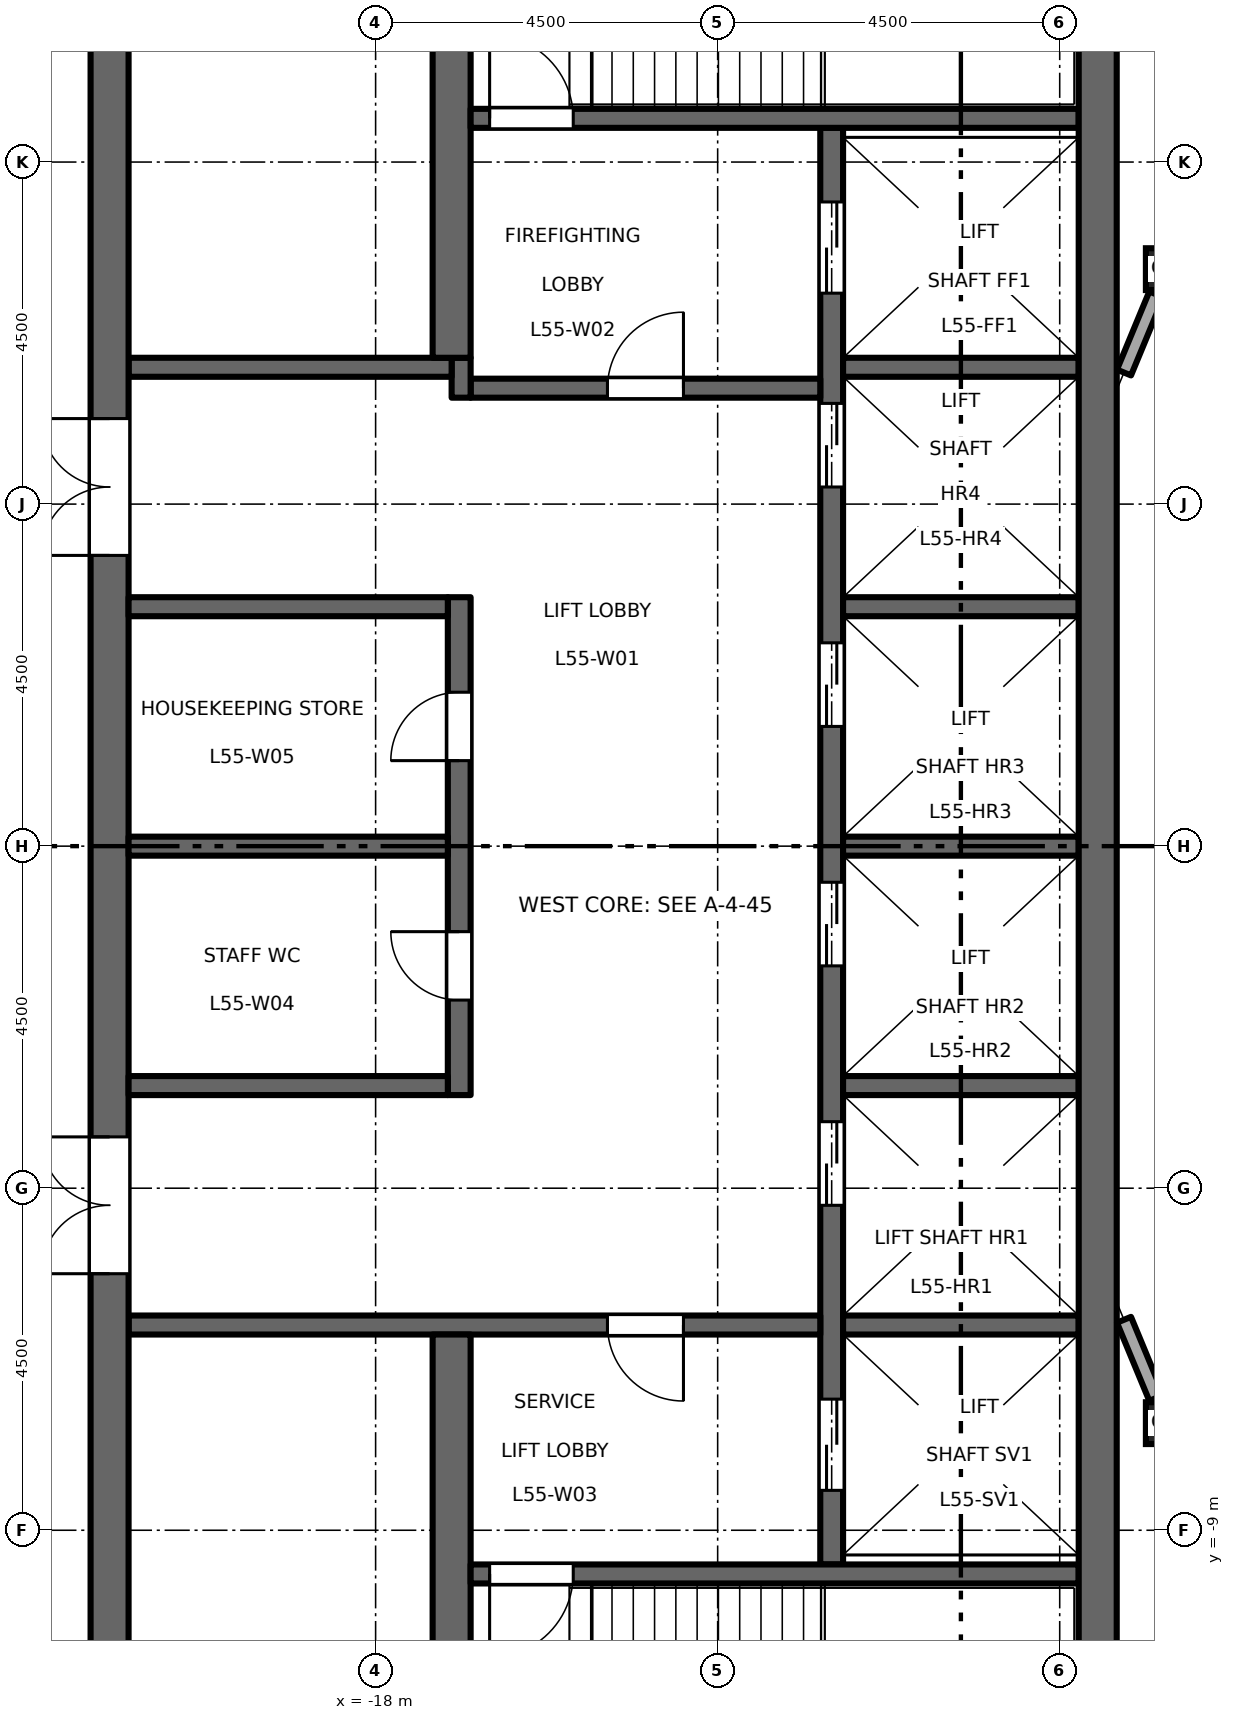
"""IFC4 building model, lengths in metres.
Left out: names, types, materials, properties, quantities, classifications, styles, units other than length and angle.
Written with IfcOpenShell. Run it as: python <this file> out.ifc"""

import sys

from ifc_helpers import new_model, si_unit, direction, frame, frame_2d, origin, origin_2d, place, context, subcontext, project, spatial, rectangle, hollow_rectangle, extrude, element, fill, save


model = new_model("IFC4")
c1 = context("Model", 3, precision=1e-05, world=origin(), true_north=direction((0.0, 1.0)))
c2 = subcontext(c1, "Body", "Model", "MODEL_VIEW")
j1 = project(units=[si_unit("LENGTHUNIT", "METRE"), si_unit("PLANEANGLEUNIT", "RADIAN")], contexts=[c1])
p1 = place(None, origin())
s1 = spatial("IfcSite", under=j1, at=p1, CompositionType="ELEMENT")
p2 = place(p1, origin())
s2 = spatial("IfcBuilding", under=s1, at=p2, CompositionType="ELEMENT")
p3 = place(p2, frame((0.0, 0.0, 255.7)))
s3 = spatial("IfcBuildingStorey", under=s2, at=p3, CompositionType="ELEMENT", Elevation=255.7)
for number, where, z_axis, x_axis in (
    (1, (-7.591, -7.591, 0.0), (0.0, 0.0, 1.0), (1.0, 0.0, 0.0)),
    (2, (-7.591, 7.591, 0.0), (0.0, 0.0, 1.0), (1.0, 0.0, 0.0)),
):
    element("IfcColumn", number, at=place(p3, frame(where, z_axis=z_axis, x_axis=x_axis)), inside=s3, PredefinedType="COLUMN", context=c2, shape_type="SweptSolid", body=[
        extrude(hollow_rectangle(XDim=0.55, YDim=0.55, WallThickness=0.028, at=origin_2d()), origin(), (0.0, 0.0, 1.0), 4.5),
    ])
p4 = place(p3, frame((-12.0, -9.45, 0.0), z_axis=(0.0, 0.0, 1.0), x_axis=(0.0, 1.0, 0.0)))
e3 = element("IfcWall", 3, at=p4, inside=s3, PredefinedType="SHEAR", context=c2, shape_type="SweptSolid", body=[
    extrude(rectangle(XDim=18.9, YDim=0.3, at=frame_2d((9.45, 0.0))), origin(), (0.0, 0.0, 1.0), 4.35),
])
p5 = place(p4, frame((4.725, 0.0, 0.0)))
e4 = element("IfcOpeningElement", 4, at=p5, cuts=e3, PredefinedType="OPENING", context=c2, shape_type="SweptSolid", body=[
    extrude(rectangle(XDim=1.1, YDim=2.1, at=frame_2d((0.55, 1.05))), frame((0.0, 0.16, 0.0), z_axis=(0.0, -1.0, 0.0), x_axis=(1.0, 0.0, 0.0)), (0.0, 0.0, 1.0), 0.32),
])
p6 = place(p4, frame((7.875, 0.0, 0.0)))
e5 = element("IfcOpeningElement", 5, at=p6, cuts=e3, PredefinedType="OPENING", context=c2, shape_type="SweptSolid", body=[
    extrude(rectangle(XDim=1.1, YDim=2.1, at=frame_2d((0.55, 1.05))), frame((0.0, 0.16, 0.0), z_axis=(0.0, -1.0, 0.0), x_axis=(1.0, 0.0, 0.0)), (0.0, 0.0, 1.0), 0.32),
])
p7 = place(p4, frame((11.025, 0.0, 0.0)))
e6 = element("IfcOpeningElement", 6, at=p7, cuts=e3, PredefinedType="OPENING", context=c2, shape_type="SweptSolid", body=[
    extrude(rectangle(XDim=1.1, YDim=2.1, at=frame_2d((0.55, 1.05))), frame((0.0, 0.16, 0.0), z_axis=(0.0, -1.0, 0.0), x_axis=(1.0, 0.0, 0.0)), (0.0, 0.0, 1.0), 0.32),
])
p8 = place(p4, frame((14.175, 0.0, 0.0)))
e7 = element("IfcOpeningElement", 7, at=p8, cuts=e3, PredefinedType="OPENING", context=c2, shape_type="SweptSolid", body=[
    extrude(rectangle(XDim=1.1, YDim=2.1, at=frame_2d((0.55, 1.05))), frame((0.0, 0.16, 0.0), z_axis=(0.0, -1.0, 0.0), x_axis=(1.0, 0.0, 0.0)), (0.0, 0.0, 1.0), 0.32),
])
p9 = place(p4, frame((16.725, 0.0, 0.0)))
e8 = element("IfcOpeningElement", 8, at=p9, cuts=e3, PredefinedType="OPENING", context=c2, shape_type="SweptSolid", body=[
    extrude(rectangle(XDim=1.2, YDim=2.1, at=frame_2d((0.6, 1.05))), frame((0.0, 0.16, 0.0), z_axis=(0.0, -1.0, 0.0), x_axis=(1.0, 0.0, 0.0)), (0.0, 0.0, 1.0), 0.32),
])
p10 = place(p4, frame((0.975, 0.0, 0.0)))
e9 = element("IfcOpeningElement", 9, at=p10, cuts=e3, PredefinedType="OPENING", context=c2, shape_type="SweptSolid", body=[
    extrude(rectangle(XDim=1.2, YDim=2.1, at=frame_2d((0.6, 1.05))), frame((0.0, 0.16, 0.0), z_axis=(0.0, -1.0, 0.0), x_axis=(1.0, 0.0, 0.0)), (0.0, 0.0, 1.0), 0.32),
])
p11 = place(p3, frame((-12.15, 6.025, 0.0), z_axis=(0.0, 0.0, 1.0), x_axis=(-1.0, 0.0, 0.0)))
e10 = element("IfcWall", 10, at=p11, inside=s3, PredefinedType="SHEAR", context=c2, shape_type="SweptSolid", body=[
    extrude(rectangle(XDim=4.6, YDim=0.25, at=frame_2d((2.3, 0.0))), origin(), (0.0, 0.0, 1.0), 4.35),
])
p12 = place(p11, frame((1.8, 0.0, 0.0)))
e11 = element("IfcOpeningElement", 11, at=p12, cuts=e10, PredefinedType="OPENING", context=c2, shape_type="SweptSolid", body=[
    extrude(rectangle(XDim=1.0, YDim=2.1, at=frame_2d((0.5, 1.05))), frame((0.0, 0.135, 0.0), z_axis=(0.0, -1.0, 0.0), x_axis=(1.0, 0.0, 0.0)), (0.0, 0.0, 1.0), 0.27),
])
p13 = place(p3, frame((-16.875, 5.9, 0.0), z_axis=(0.0, 0.0, 1.0), x_axis=(0.0, 1.0, 0.0)))
e12 = element("IfcWall", 12, at=p13, inside=s3, PredefinedType="SHEAR", context=c2, shape_type="SweptSolid", body=[
    extrude(rectangle(XDim=0.525, YDim=0.25, at=frame_2d((0.263, 0.0))), origin(), (0.0, 0.0, 1.0), 4.35),
])
p14 = place(p3, frame((-17.0, 6.3, 0.0), z_axis=(0.0, 0.0, 1.0), x_axis=(-1.0, 0.0, 0.0)))
e13 = element("IfcWall", 13, at=p14, inside=s3, PredefinedType="SHEAR", context=c2, shape_type="SweptSolid", body=[
    extrude(rectangle(XDim=4.25, YDim=0.25, at=frame_2d((2.125, 0.0))), origin(), (0.0, 0.0, 1.0), 4.35),
])
p15 = place(p3, frame((-12.15, -6.3, 0.0), z_axis=(0.0, 0.0, 1.0), x_axis=(-1.0, 0.0, 0.0)))
e14 = element("IfcWall", 14, at=p15, inside=s3, PredefinedType="SHEAR", context=c2, shape_type="SweptSolid", body=[
    extrude(rectangle(XDim=9.1, YDim=0.25, at=frame_2d((4.55, 0.0))), origin(), (0.0, 0.0, 1.0), 4.35),
])
p16 = place(p15, frame((1.8, 0.0, 0.0)))
e15 = element("IfcOpeningElement", 15, at=p16, cuts=e14, PredefinedType="OPENING", context=c2, shape_type="SweptSolid", body=[
    extrude(rectangle(XDim=1.0, YDim=2.1, at=frame_2d((0.5, 1.05))), frame((0.0, 0.135, 0.0), z_axis=(0.0, -1.0, 0.0), x_axis=(1.0, 0.0, 0.0)), (0.0, 0.0, 1.0), 0.27),
])
p17 = place(p3, frame((-21.5, -13.0, 0.0), z_axis=(0.0, 0.0, 1.0), x_axis=(0.0, 1.0, 0.0)))
e16 = element("IfcWall", 16, at=p17, inside=s3, PredefinedType="SHEAR", context=c2, shape_type="SweptSolid", body=[
    extrude(rectangle(XDim=26.0, YDim=0.5, at=frame_2d((13.0, 0.0))), origin(), (0.0, 0.0, 1.0), 4.35),
])
p18 = place(p17, frame((16.825, 0.0, 0.0)))
e17 = element("IfcOpeningElement", 17, at=p18, cuts=e16, PredefinedType="OPENING", context=c2, shape_type="SweptSolid", body=[
    extrude(rectangle(XDim=1.8, YDim=2.1, at=frame_2d((0.9, 1.05))), frame((0.0, 0.26, 0.0), z_axis=(0.0, -1.0, 0.0), x_axis=(1.0, 0.0, 0.0)), (0.0, 0.0, 1.0), 0.52),
])
p19 = place(p17, frame((7.375, 0.0, 0.0)))
e18 = element("IfcOpeningElement", 18, at=p19, cuts=e16, PredefinedType="OPENING", context=c2, shape_type="SweptSolid", body=[
    extrude(rectangle(XDim=1.8, YDim=2.1, at=frame_2d((0.9, 1.05))), frame((0.0, 0.26, 0.0), z_axis=(0.0, -1.0, 0.0), x_axis=(1.0, 0.0, 0.0)), (0.0, 0.0, 1.0), 0.52),
])
p20 = place(p3, frame((-16.9, -3.275, 0.0), z_axis=(0.0, 0.0, 1.0), x_axis=(0.0, 1.0, 0.0)))
e19 = element("IfcWall", 19, at=p20, inside=s3, PredefinedType="SHEAR", context=c2, shape_type="SweptSolid", body=[
    extrude(rectangle(XDim=6.55, YDim=0.3, at=frame_2d((3.275, 0.0))), origin(), (0.0, 0.0, 1.0), 4.35),
])
p21 = place(p20, frame((1.25, 0.0, 0.0)))
e20 = element("IfcOpeningElement", 20, at=p21, cuts=e19, PredefinedType="OPENING", context=c2, shape_type="SweptSolid", body=[
    extrude(rectangle(XDim=0.9, YDim=2.1, at=frame_2d((0.45, 1.05))), frame((0.0, 0.16, 0.0), z_axis=(0.0, -1.0, 0.0), x_axis=(1.0, 0.0, 0.0)), (0.0, 0.0, 1.0), 0.32),
])
p22 = place(p20, frame((4.4, 0.0, 0.0)))
e21 = element("IfcOpeningElement", 21, at=p22, cuts=e19, PredefinedType="OPENING", context=c2, shape_type="SweptSolid", body=[
    extrude(rectangle(XDim=0.9, YDim=2.1, at=frame_2d((0.45, 1.05))), frame((0.0, 0.16, 0.0), z_axis=(0.0, -1.0, 0.0), x_axis=(1.0, 0.0, 0.0)), (0.0, 0.0, 1.0), 0.32),
])
for number, where, z_axis, x_axis in (
    (22, (-17.05, 0.0, 0.0), (0.0, 0.0, 1.0), (-1.0, 0.0, 0.0)),
    (23, (-17.05, 3.15, 0.0), (0.0, 0.0, 1.0), (-1.0, 0.0, 0.0)),
    (24, (-17.05, -3.15, 0.0), (0.0, 0.0, 1.0), (-1.0, 0.0, 0.0)),
):
    element("IfcWall", number, at=place(p3, frame(where, z_axis=z_axis, x_axis=x_axis)), inside=s3, PredefinedType="SHEAR", context=c2, shape_type="SweptSolid", body=[
        extrude(rectangle(XDim=4.2, YDim=0.25, at=frame_2d((2.1, 0.0))), origin(), (0.0, 0.0, 1.0), 4.35),
    ])
for number, where, z_axis, x_axis in (
    (25, (-17.0, 6.425, 0.0), (0.0, 0.0, 1.0), (0.0, 1.0, 0.0)),
    (26, (-17.0, -13.0, 0.0), (0.0, 0.0, 1.0), (0.0, 1.0, 0.0)),
):
    element("IfcWall", number, at=place(p3, frame(where, z_axis=z_axis, x_axis=x_axis)), inside=s3, PredefinedType="SHEAR", context=c2, shape_type="SweptSolid", body=[
        extrude(rectangle(XDim=6.575, YDim=0.5, at=frame_2d((3.288, 0.0))), origin(), (0.0, 0.0, 1.0), 4.35),
    ])
for number, where, z_axis, x_axis in (
    (27, (-8.75, 0.0, 0.0), (0.0, 0.0, 1.0), (-1.0, 0.0, 0.0)),
    (28, (-8.75, 3.15, 0.0), (0.0, 0.0, 1.0), (-1.0, 0.0, 0.0)),
    (29, (-8.75, 6.3, 0.0), (0.0, 0.0, 1.0), (-1.0, 0.0, 0.0)),
    (30, (-8.75, -3.15, 0.0), (0.0, 0.0, 1.0), (-1.0, 0.0, 0.0)),
    (31, (-8.75, -6.3, 0.0), (0.0, 0.0, 1.0), (-1.0, 0.0, 0.0)),
):
    element("IfcWall", number, at=place(p3, frame(where, z_axis=z_axis, x_axis=x_axis)), inside=s3, PredefinedType="SHEAR", context=c2, shape_type="SweptSolid", body=[
        extrude(rectangle(XDim=3.1, YDim=0.25, at=frame_2d((1.55, 0.0))), origin(), (0.0, 0.0, 1.0), 4.35),
    ])
p23 = place(p3, frame((-8.75, 9.575, 0.0), z_axis=(0.0, 0.0, 1.0), x_axis=(-1.0, 0.0, 0.0)))
e32 = element("IfcWall", 32, at=p23, inside=s3, PredefinedType="SHEAR", context=c2, shape_type="SweptSolid", body=[
    extrude(rectangle(XDim=8.0, YDim=0.25, at=frame_2d((4.0, 0.0))), origin(), (0.0, 0.0, 1.0), 4.35),
])
p24 = place(p23, frame((6.65, 0.0, 0.0)))
e33 = element("IfcOpeningElement", 33, at=p24, cuts=e32, PredefinedType="OPENING", context=c2, shape_type="SweptSolid", body=[
    extrude(rectangle(XDim=1.1, YDim=2.1, at=frame_2d((0.55, 1.05))), frame((0.0, 0.135, 0.0), z_axis=(0.0, -1.0, 0.0), x_axis=(1.0, 0.0, 0.0)), (0.0, 0.0, 1.0), 0.27),
])
p25 = place(p3, frame((-8.75, -9.575, 0.0), z_axis=(0.0, 0.0, 1.0), x_axis=(-1.0, 0.0, 0.0)))
e34 = element("IfcWall", 34, at=p25, inside=s3, PredefinedType="SHEAR", context=c2, shape_type="SweptSolid", body=[
    extrude(rectangle(XDim=8.0, YDim=0.25, at=frame_2d((4.0, 0.0))), origin(), (0.0, 0.0, 1.0), 4.35),
])
p26 = place(p25, frame((6.65, 0.0, 0.0)))
e35 = element("IfcOpeningElement", 35, at=p26, cuts=e34, PredefinedType="OPENING", context=c2, shape_type="SweptSolid", body=[
    extrude(rectangle(XDim=1.1, YDim=2.1, at=frame_2d((0.55, 1.05))), frame((0.0, 0.135, 0.0), z_axis=(0.0, -1.0, 0.0), x_axis=(1.0, 0.0, 0.0)), (0.0, 0.0, 1.0), 0.27),
])
p27 = place(p3, frame((-8.5, -13.0, 0.0), z_axis=(0.0, 0.0, 1.0), x_axis=(0.0, 1.0, 0.0)))
e36 = element("IfcWall", 36, at=p27, inside=s3, PredefinedType="SHEAR", context=c2, shape_type="SweptSolid", body=[
    extrude(rectangle(XDim=26.0, YDim=0.5, at=frame_2d((13.0, 0.0))), origin(), (0.0, 0.0, 1.0), 4.35),
])
for number, where, z_axis, x_axis in (
    (37, (-7.729, 7.259, 0.0), (0.0, 0.0, 1.0), (-0.383, -0.924, 0.0)),
    (38, (-8.154, -6.231, 0.0), (0.0, 0.0, 1.0), (0.383, -0.924, 0.0)),
):
    element("IfcWall", number, at=place(p3, frame(where, z_axis=z_axis, x_axis=x_axis)), inside=s3, PredefinedType="STANDARD", context=c2, shape_type="SweptSolid", body=[
        extrude(rectangle(XDim=1.113, YDim=0.2, at=frame_2d((0.556, 0.0))), origin(), (0.0, 0.0, 1.0), 3.918),
    ])
p28 = place(p12, origin())
e39 = element("IfcDoor", 39, at=p28, inside=s3, OperationType="SINGLE_SWING_LEFT", PredefinedType="DOOR", context=c2, shape_type="SweptSolid", body=[
    extrude(rectangle(XDim=1.0, YDim=2.1, at=frame_2d((0.5, 1.05))), frame((0.0, 0.025, 0.0), z_axis=(0.0, -1.0, 0.0), x_axis=(1.0, 0.0, 0.0)), (0.0, 0.0, 1.0), 0.05),
])
fill(e11, e39)
p29 = place(p16, origin())
e40 = element("IfcDoor", 40, at=p29, inside=s3, OperationType="SINGLE_SWING_RIGHT", PredefinedType="DOOR", context=c2, shape_type="SweptSolid", body=[
    extrude(rectangle(XDim=1.0, YDim=2.1, at=frame_2d((0.5, 1.05))), frame((0.0, 0.025, 0.0), z_axis=(0.0, -1.0, 0.0), x_axis=(1.0, 0.0, 0.0)), (0.0, 0.0, 1.0), 0.05),
])
fill(e15, e40)
p30 = place(p24, origin())
e41 = element("IfcDoor", 41, at=p30, inside=s3, OperationType="SINGLE_SWING_RIGHT", PredefinedType="DOOR", context=c2, shape_type="SweptSolid", body=[
    extrude(rectangle(XDim=1.1, YDim=2.1, at=frame_2d((0.55, 1.05))), frame((0.0, 0.025, 0.0), z_axis=(0.0, -1.0, 0.0), x_axis=(1.0, 0.0, 0.0)), (0.0, 0.0, 1.0), 0.05),
])
fill(e33, e41)
p31 = place(p26, origin())
e42 = element("IfcDoor", 42, at=p31, inside=s3, OperationType="SINGLE_SWING_LEFT", PredefinedType="DOOR", context=c2, shape_type="SweptSolid", body=[
    extrude(rectangle(XDim=1.1, YDim=2.1, at=frame_2d((0.55, 1.05))), frame((0.0, 0.025, 0.0), z_axis=(0.0, -1.0, 0.0), x_axis=(1.0, 0.0, 0.0)), (0.0, 0.0, 1.0), 0.05),
])
fill(e35, e42)
p32 = place(p18, origin())
e43 = element("IfcDoor", 43, at=p32, inside=s3, OperationType="DOUBLE_DOOR_DOUBLE_SWING", PredefinedType="DOOR", context=c2, shape_type="SweptSolid", body=[
    extrude(rectangle(XDim=1.8, YDim=2.1, at=frame_2d((0.9, 1.05))), frame((0.0, 0.025, 0.0), z_axis=(0.0, -1.0, 0.0), x_axis=(1.0, 0.0, 0.0)), (0.0, 0.0, 1.0), 0.05),
])
fill(e17, e43)
p33 = place(p19, origin())
e44 = element("IfcDoor", 44, at=p33, inside=s3, OperationType="DOUBLE_DOOR_DOUBLE_SWING", PredefinedType="DOOR", context=c2, shape_type="SweptSolid", body=[
    extrude(rectangle(XDim=1.8, YDim=2.1, at=frame_2d((0.9, 1.05))), frame((0.0, 0.025, 0.0), z_axis=(0.0, -1.0, 0.0), x_axis=(1.0, 0.0, 0.0)), (0.0, 0.0, 1.0), 0.05),
])
fill(e18, e44)
p34 = place(p5, origin())
e45 = element("IfcDoor", 45, at=p34, inside=s3, OperationType="DOUBLE_DOOR_SLIDING", PredefinedType="DOOR", context=c2, shape_type="SweptSolid", body=[
    extrude(rectangle(XDim=1.1, YDim=2.1, at=frame_2d((0.55, 1.05))), frame((0.0, 0.025, 0.0), z_axis=(0.0, -1.0, 0.0), x_axis=(1.0, 0.0, 0.0)), (0.0, 0.0, 1.0), 0.05),
])
fill(e4, e45)
p35 = place(p6, origin())
e46 = element("IfcDoor", 46, at=p35, inside=s3, OperationType="DOUBLE_DOOR_SLIDING", PredefinedType="DOOR", context=c2, shape_type="SweptSolid", body=[
    extrude(rectangle(XDim=1.1, YDim=2.1, at=frame_2d((0.55, 1.05))), frame((0.0, 0.025, 0.0), z_axis=(0.0, -1.0, 0.0), x_axis=(1.0, 0.0, 0.0)), (0.0, 0.0, 1.0), 0.05),
])
fill(e5, e46)
p36 = place(p7, origin())
e47 = element("IfcDoor", 47, at=p36, inside=s3, OperationType="DOUBLE_DOOR_SLIDING", PredefinedType="DOOR", context=c2, shape_type="SweptSolid", body=[
    extrude(rectangle(XDim=1.1, YDim=2.1, at=frame_2d((0.55, 1.05))), frame((0.0, 0.025, 0.0), z_axis=(0.0, -1.0, 0.0), x_axis=(1.0, 0.0, 0.0)), (0.0, 0.0, 1.0), 0.05),
])
fill(e6, e47)
p37 = place(p8, origin())
e48 = element("IfcDoor", 48, at=p37, inside=s3, OperationType="DOUBLE_DOOR_SLIDING", PredefinedType="DOOR", context=c2, shape_type="SweptSolid", body=[
    extrude(rectangle(XDim=1.1, YDim=2.1, at=frame_2d((0.55, 1.05))), frame((0.0, 0.025, 0.0), z_axis=(0.0, -1.0, 0.0), x_axis=(1.0, 0.0, 0.0)), (0.0, 0.0, 1.0), 0.05),
])
fill(e7, e48)
p38 = place(p9, origin())
e49 = element("IfcDoor", 49, at=p38, inside=s3, OperationType="DOUBLE_DOOR_SLIDING", PredefinedType="DOOR", context=c2, shape_type="SweptSolid", body=[
    extrude(rectangle(XDim=1.2, YDim=2.1, at=frame_2d((0.6, 1.05))), frame((0.0, 0.025, 0.0), z_axis=(0.0, -1.0, 0.0), x_axis=(1.0, 0.0, 0.0)), (0.0, 0.0, 1.0), 0.05),
])
fill(e8, e49)
p39 = place(p10, origin())
e50 = element("IfcDoor", 50, at=p39, inside=s3, OperationType="DOUBLE_DOOR_SLIDING", PredefinedType="DOOR", context=c2, shape_type="SweptSolid", body=[
    extrude(rectangle(XDim=1.2, YDim=2.1, at=frame_2d((0.6, 1.05))), frame((0.0, 0.025, 0.0), z_axis=(0.0, -1.0, 0.0), x_axis=(1.0, 0.0, 0.0)), (0.0, 0.0, 1.0), 0.05),
])
fill(e9, e50)
p40 = place(p21, origin())
e51 = element("IfcDoor", 51, at=p40, inside=s3, OperationType="SINGLE_SWING_LEFT", PredefinedType="DOOR", context=c2, shape_type="SweptSolid", body=[
    extrude(rectangle(XDim=0.9, YDim=2.1, at=frame_2d((0.45, 1.05))), frame((0.0, 0.025, 0.0), z_axis=(0.0, -1.0, 0.0), x_axis=(1.0, 0.0, 0.0)), (0.0, 0.0, 1.0), 0.05),
])
fill(e20, e51)
p41 = place(p22, origin())
e52 = element("IfcDoor", 52, at=p41, inside=s3, OperationType="SINGLE_SWING_RIGHT", PredefinedType="DOOR", context=c2, shape_type="SweptSolid", body=[
    extrude(rectangle(XDim=0.9, YDim=2.1, at=frame_2d((0.45, 1.05))), frame((0.0, 0.025, 0.0), z_axis=(0.0, -1.0, 0.0), x_axis=(1.0, 0.0, 0.0)), (0.0, 0.0, 1.0), 0.05),
])
fill(e21, e52)
save(model, sys.argv[1])
